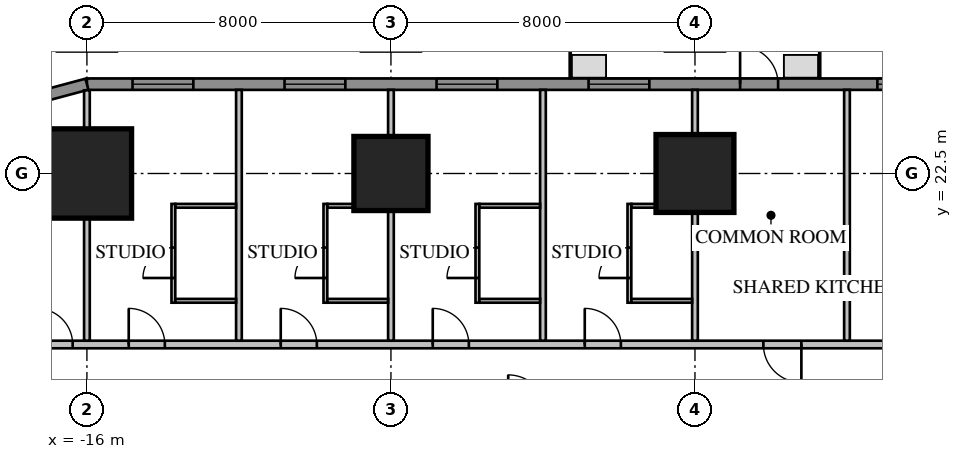
"""IFC4 building model, lengths in metres.
Left out: names, types, materials, properties, quantities, classifications, styles, units other than length and angle.
Written with IfcOpenShell. Run it as: python <this file> out.ifc"""

import sys

from ifc_helpers import new_model, si_unit, direction, frame, frame_2d, origin, origin_2d, place, context, subcontext, project, spatial, rectangle, extrude, element, fill, save


model = new_model("IFC4")
c1 = context("Model", 3, precision=1e-05, world=origin(), true_north=direction((0.0, 1.0)))
c2 = subcontext(c1, "Body", "Model", "MODEL_VIEW")
j1 = project(units=[si_unit("LENGTHUNIT", "METRE"), si_unit("PLANEANGLEUNIT", "RADIAN")], contexts=[c1])
p1 = place(None, origin())
s1 = spatial("IfcSite", under=j1, at=p1, CompositionType="ELEMENT")
p2 = place(p1, origin())
s2 = spatial("IfcBuilding", under=s1, at=p2, CompositionType="ELEMENT")
p3 = place(p2, frame((0.0, 0.0, 50.65)))
s3 = spatial("IfcBuildingStorey", under=s2, at=p3, CompositionType="ELEMENT", Elevation=50.65)
p4 = place(p3, frame((0.0, 22.5, 0.0), z_axis=(0.0, 0.0, 1.0), x_axis=(1.0, 0.0, 0.0)))
e1 = element("IfcColumn", 1, at=p4, inside=s3, PredefinedType="COLUMN", context=c2, shape_type="SweptSolid", body=[
    extrude(rectangle(XDim=2.05, YDim=2.05, at=origin_2d()), origin(), (0.0, 0.0, 1.0), 3.413),
])
p5 = place(p3, frame((-8.0, 22.5, 0.0), z_axis=(0.0, 0.0, 1.0), x_axis=(1.0, 0.0, 0.0)))
e2 = element("IfcColumn", 2, at=p5, inside=s3, PredefinedType="COLUMN", context=c2, shape_type="SweptSolid", body=[
    extrude(rectangle(XDim=1.95, YDim=1.95, at=origin_2d()), origin(), (0.0, 0.0, 1.0), 3.413),
])
p6 = place(p3, frame((-16.0, 22.5, 0.0), z_axis=(0.0, 0.0, 1.0), x_axis=(1.0, 0.0, 0.0)))
e3 = element("IfcColumn", 3, at=p6, inside=s3, PredefinedType="COLUMN", context=c2, shape_type="SweptSolid", body=[
    extrude(rectangle(XDim=2.35, YDim=2.35, at=origin_2d()), origin(), (0.0, 0.0, 1.0), 3.413),
])
p7 = place(p3, frame((16.0, 24.85, 0.0), z_axis=(0.0, 0.0, 1.0), x_axis=(-1.0, 0.0, 0.0)))
e4 = element("IfcWall", 4, at=p7, inside=s3, PredefinedType="SOLIDWALL", context=c2, shape_type="SweptSolid", body=[
    extrude(rectangle(XDim=32.0, YDim=0.3, at=frame_2d((16.0, 0.0))), origin(), (0.0, 0.0, 1.0), 3.65),
])
p8 = place(p7, frame((1.2, 0.0, 0.75)))
e5 = element("IfcOpeningElement", 5, at=p8, cuts=e4, PredefinedType="OPENING", context=c2, shape_type="SweptSolid", body=[
    extrude(rectangle(XDim=1.6, YDim=1.8, at=frame_2d((0.8, 0.9))), frame((0.0, 0.17, 0.0), z_axis=(0.0, -1.0, 0.0), x_axis=(1.0, 0.0, 0.0)), (0.0, 0.0, 1.0), 0.34),
])
p9 = place(p7, frame((5.2, 0.0, 0.75)))
e6 = element("IfcOpeningElement", 6, at=p9, cuts=e4, PredefinedType="OPENING", context=c2, shape_type="SweptSolid", body=[
    extrude(rectangle(XDim=1.6, YDim=1.8, at=frame_2d((0.8, 0.9))), frame((0.0, 0.17, 0.0), z_axis=(0.0, -1.0, 0.0), x_axis=(1.0, 0.0, 0.0)), (0.0, 0.0, 1.0), 0.34),
])
p10 = place(p7, frame((17.2, 0.0, 0.75)))
e7 = element("IfcOpeningElement", 7, at=p10, cuts=e4, PredefinedType="OPENING", context=c2, shape_type="SweptSolid", body=[
    extrude(rectangle(XDim=1.6, YDim=1.8, at=frame_2d((0.8, 0.9))), frame((0.0, 0.17, 0.0), z_axis=(0.0, -1.0, 0.0), x_axis=(1.0, 0.0, 0.0)), (0.0, 0.0, 1.0), 0.34),
])
p11 = place(p7, frame((21.2, 0.0, 0.75)))
e8 = element("IfcOpeningElement", 8, at=p11, cuts=e4, PredefinedType="OPENING", context=c2, shape_type="SweptSolid", body=[
    extrude(rectangle(XDim=1.6, YDim=1.8, at=frame_2d((0.8, 0.9))), frame((0.0, 0.17, 0.0), z_axis=(0.0, -1.0, 0.0), x_axis=(1.0, 0.0, 0.0)), (0.0, 0.0, 1.0), 0.34),
])
p12 = place(p7, frame((25.2, 0.0, 0.75)))
e9 = element("IfcOpeningElement", 9, at=p12, cuts=e4, PredefinedType="OPENING", context=c2, shape_type="SweptSolid", body=[
    extrude(rectangle(XDim=1.6, YDim=1.8, at=frame_2d((0.8, 0.9))), frame((0.0, 0.17, 0.0), z_axis=(0.0, -1.0, 0.0), x_axis=(1.0, 0.0, 0.0)), (0.0, 0.0, 1.0), 0.34),
])
p13 = place(p7, frame((29.2, 0.0, 0.75)))
e10 = element("IfcOpeningElement", 10, at=p13, cuts=e4, PredefinedType="OPENING", context=c2, shape_type="SweptSolid", body=[
    extrude(rectangle(XDim=1.6, YDim=1.8, at=frame_2d((0.8, 0.9))), frame((0.0, 0.17, 0.0), z_axis=(0.0, -1.0, 0.0), x_axis=(1.0, 0.0, 0.0)), (0.0, 0.0, 1.0), 0.34),
])
p14 = place(p7, frame((8.8, 0.0, 0.75)))
e11 = element("IfcOpeningElement", 11, at=p14, cuts=e4, PredefinedType="OPENING", context=c2, shape_type="SweptSolid", body=[
    extrude(rectangle(XDim=2.4, YDim=1.8, at=frame_2d((1.2, 0.9))), frame((0.0, 0.17, 0.0), z_axis=(0.0, -1.0, 0.0), x_axis=(1.0, 0.0, 0.0)), (0.0, 0.0, 1.0), 0.34),
])
p15 = place(p7, frame((13.812, 0.0, 0.0)))
e12 = element("IfcOpeningElement", 12, at=p15, cuts=e4, PredefinedType="OPENING", context=c2, shape_type="SweptSolid", body=[
    extrude(rectangle(XDim=1.0, YDim=2.4, at=frame_2d((0.5, 1.2))), frame((0.0, 0.17, 0.0), z_axis=(0.0, -1.0, 0.0), x_axis=(1.0, 0.0, 0.0)), (0.0, 0.0, 1.0), 0.34),
])
p16 = place(p3, frame((-16.0, 24.85, 0.0), z_axis=(0.0, 0.0, 1.0), x_axis=(-0.965920218567, -0.258839972501, 0.0)))
e13 = element("IfcWall", 13, at=p16, inside=s3, PredefinedType="SOLIDWALL", context=c2, shape_type="SweptSolid", body=[
    extrude(rectangle(XDim=4.581, YDim=0.3, at=frame_2d((2.291, 0.0))), origin(), (0.0, 0.0, 1.0), 3.65),
])
p17 = place(p3, frame((18.0, 18.0, 0.0), z_axis=(0.0, 0.0, 1.0), x_axis=(-1.0, 0.0, 0.0)))
e14 = element("IfcWall", 14, at=p17, inside=s3, PredefinedType="PARTITIONING", context=c2, shape_type="SweptSolid", body=[
    extrude(rectangle(XDim=36.0, YDim=0.2, at=frame_2d((18.0, 0.0))), origin(), (0.0, 0.0, 1.0), 3.65),
])
p18 = place(p17, frame((0.375, 0.0, 0.0)))
e15 = element("IfcOpeningElement", 15, at=p18, cuts=e14, PredefinedType="OPENING", context=c2, shape_type="SweptSolid", body=[
    extrude(rectangle(XDim=1.0, YDim=2.1, at=frame_2d((0.5, 1.05))), frame((0.0, 0.12, 0.0), z_axis=(0.0, -1.0, 0.0), x_axis=(1.0, 0.0, 0.0)), (0.0, 0.0, 1.0), 0.24),
])
p19 = place(p17, frame((3.95, 0.0, 0.0)))
e16 = element("IfcOpeningElement", 16, at=p19, cuts=e14, PredefinedType="OPENING", context=c2, shape_type="SweptSolid", body=[
    extrude(rectangle(XDim=0.95, YDim=2.1, at=frame_2d((0.475, 1.05))), frame((0.0, 0.12, 0.0), z_axis=(0.0, -1.0, 0.0), x_axis=(1.0, 0.0, 0.0)), (0.0, 0.0, 1.0), 0.24),
])
p20 = place(p17, frame((7.95, 0.0, 0.0)))
e17 = element("IfcOpeningElement", 17, at=p20, cuts=e14, PredefinedType="OPENING", context=c2, shape_type="SweptSolid", body=[
    extrude(rectangle(XDim=0.95, YDim=2.1, at=frame_2d((0.475, 1.05))), frame((0.0, 0.12, 0.0), z_axis=(0.0, -1.0, 0.0), x_axis=(1.0, 0.0, 0.0)), (0.0, 0.0, 1.0), 0.24),
])
p21 = place(p17, frame((19.95, 0.0, 0.0)))
e18 = element("IfcOpeningElement", 18, at=p21, cuts=e14, PredefinedType="OPENING", context=c2, shape_type="SweptSolid", body=[
    extrude(rectangle(XDim=0.95, YDim=2.1, at=frame_2d((0.475, 1.05))), frame((0.0, 0.12, 0.0), z_axis=(0.0, -1.0, 0.0), x_axis=(1.0, 0.0, 0.0)), (0.0, 0.0, 1.0), 0.24),
])
p22 = place(p17, frame((23.95, 0.0, 0.0)))
e19 = element("IfcOpeningElement", 19, at=p22, cuts=e14, PredefinedType="OPENING", context=c2, shape_type="SweptSolid", body=[
    extrude(rectangle(XDim=0.95, YDim=2.1, at=frame_2d((0.475, 1.05))), frame((0.0, 0.12, 0.0), z_axis=(0.0, -1.0, 0.0), x_axis=(1.0, 0.0, 0.0)), (0.0, 0.0, 1.0), 0.24),
])
p23 = place(p17, frame((27.95, 0.0, 0.0)))
e20 = element("IfcOpeningElement", 20, at=p23, cuts=e14, PredefinedType="OPENING", context=c2, shape_type="SweptSolid", body=[
    extrude(rectangle(XDim=0.95, YDim=2.1, at=frame_2d((0.475, 1.05))), frame((0.0, 0.12, 0.0), z_axis=(0.0, -1.0, 0.0), x_axis=(1.0, 0.0, 0.0)), (0.0, 0.0, 1.0), 0.24),
])
p24 = place(p17, frame((31.95, 0.0, 0.0)))
e21 = element("IfcOpeningElement", 21, at=p24, cuts=e14, PredefinedType="OPENING", context=c2, shape_type="SweptSolid", body=[
    extrude(rectangle(XDim=0.95, YDim=2.1, at=frame_2d((0.475, 1.05))), frame((0.0, 0.12, 0.0), z_axis=(0.0, -1.0, 0.0), x_axis=(1.0, 0.0, 0.0)), (0.0, 0.0, 1.0), 0.24),
])
p25 = place(p17, frame((34.375, 0.0, 0.0)))
e22 = element("IfcOpeningElement", 22, at=p25, cuts=e14, PredefinedType="OPENING", context=c2, shape_type="SweptSolid", body=[
    extrude(rectangle(XDim=0.95, YDim=2.1, at=frame_2d((0.475, 1.05))), frame((0.0, 0.12, 0.0), z_axis=(0.0, -1.0, 0.0), x_axis=(1.0, 0.0, 0.0)), (0.0, 0.0, 1.0), 0.24),
])
p26 = place(p17, frame((11.2, 0.0, 0.0)))
e23 = element("IfcOpeningElement", 23, at=p26, cuts=e14, PredefinedType="OPENING", context=c2, shape_type="SweptSolid", body=[
    extrude(rectangle(XDim=1.0, YDim=2.1, at=frame_2d((0.5, 1.05))), frame((0.0, 0.12, 0.0), z_axis=(0.0, -1.0, 0.0), x_axis=(1.0, 0.0, 0.0)), (0.0, 0.0, 1.0), 0.24),
])
p27 = place(p17, frame((15.2, 0.0, 0.0)))
e24 = element("IfcOpeningElement", 24, at=p27, cuts=e14, PredefinedType="OPENING", context=c2, shape_type="SweptSolid", body=[
    extrude(rectangle(XDim=1.0, YDim=2.1, at=frame_2d((0.5, 1.05))), frame((0.0, 0.12, 0.0), z_axis=(0.0, -1.0, 0.0), x_axis=(1.0, 0.0, 0.0)), (0.0, 0.0, 1.0), 0.24),
])
p28 = place(p3, frame((4.0, 18.1, 0.0), z_axis=(0.0, 0.0, 1.0), x_axis=(0.0, 1.0, 0.0)))
e25 = element("IfcWall", 25, at=p28, inside=s3, PredefinedType="PARTITIONING", context=c2, shape_type="SweptSolid", body=[
    extrude(rectangle(XDim=6.6, YDim=0.15, at=frame_2d((3.3, 0.0))), origin(), (0.0, 0.0, 1.0), 3.65),
])
p29 = place(p3, frame((0.0, 18.1, 0.0), z_axis=(0.0, 0.0, 1.0), x_axis=(0.0, 1.0, 0.0)))
e26 = element("IfcWall", 26, at=p29, inside=s3, PredefinedType="PARTITIONING", context=c2, shape_type="SweptSolid", body=[
    extrude(rectangle(XDim=6.6, YDim=0.15, at=frame_2d((3.3, 0.0))), origin(), (0.0, 0.0, 1.0), 2.624),
])
for number, where, z_axis, x_axis in (
    (27, (-4.0, 18.1, 0.0), (0.0, 0.0, 1.0), (0.0, 1.0, 0.0)),
    (28, (-8.0, 18.1, 0.0), (0.0, 0.0, 1.0), (0.0, 1.0, 0.0)),
    (29, (-12.0, 18.1, 0.0), (0.0, 0.0, 1.0), (0.0, 1.0, 0.0)),
):
    element("IfcWall", number, at=place(p3, frame(where, z_axis=z_axis, x_axis=x_axis)), inside=s3, PredefinedType="PARTITIONING", context=c2, shape_type="SweptSolid", body=[
        extrude(rectangle(XDim=6.6, YDim=0.15, at=frame_2d((3.3, 0.0))), origin(), (0.0, 0.0, 1.0), 3.65),
    ])
p30 = place(p3, frame((-16.0, 18.1, 0.0), z_axis=(0.0, 0.0, 1.0), x_axis=(0.0, 1.0, 0.0)))
e30 = element("IfcWall", 30, at=p30, inside=s3, PredefinedType="PARTITIONING", context=c2, shape_type="SweptSolid", body=[
    extrude(rectangle(XDim=6.589, YDim=0.15, at=frame_2d((3.295, 0.0))), origin(), (0.0, 0.0, 1.0), 3.65),
])
p31 = place(p3, frame((-1.725, 19.1, 0.0), z_axis=(0.0, 0.0, 1.0), x_axis=(0.0, 1.0, 0.0)))
e31 = element("IfcWall", 31, at=p31, inside=s3, PredefinedType="PARTITIONING", context=c2, shape_type="SweptSolid", body=[
    extrude(rectangle(XDim=2.6, YDim=0.1, at=frame_2d((1.3, 0.0))), origin(), (0.0, 0.0, 1.0), 3.65),
])
p32 = place(p31, frame((0.65, 0.0, 0.0)))
e32 = element("IfcOpeningElement", 32, at=p32, cuts=e31, PredefinedType="OPENING", context=c2, shape_type="SweptSolid", body=[
    extrude(rectangle(XDim=0.8, YDim=2.1, at=frame_2d((0.4, 1.05))), frame((0.0, 0.07, 0.0), z_axis=(0.0, -1.0, 0.0), x_axis=(1.0, 0.0, 0.0)), (0.0, 0.0, 1.0), 0.14),
])
p33 = place(p3, frame((-0.075, 21.65, 0.0), z_axis=(0.0, 0.0, 1.0), x_axis=(-1.0, 0.0, 0.0)))
e33 = element("IfcWall", 33, at=p33, inside=s3, PredefinedType="PARTITIONING", context=c2, shape_type="SweptSolid", body=[
    extrude(rectangle(XDim=1.6, YDim=0.1, at=frame_2d((0.8, 0.0))), origin(), (0.0, 0.0, 1.0), 3.65),
])
p34 = place(p3, frame((-0.075, 19.15, 0.0), z_axis=(0.0, 0.0, 1.0), x_axis=(-1.0, 0.0, 0.0)))
e34 = element("IfcWall", 34, at=p34, inside=s3, PredefinedType="PARTITIONING", context=c2, shape_type="SweptSolid", body=[
    extrude(rectangle(XDim=1.6, YDim=0.1, at=frame_2d((0.8, 0.0))), origin(), (0.0, 0.0, 1.0), 3.038),
])
p35 = place(p3, frame((-5.725, 19.1, 0.0), z_axis=(0.0, 0.0, 1.0), x_axis=(0.0, 1.0, 0.0)))
e35 = element("IfcWall", 35, at=p35, inside=s3, PredefinedType="PARTITIONING", context=c2, shape_type="SweptSolid", body=[
    extrude(rectangle(XDim=2.6, YDim=0.1, at=frame_2d((1.3, 0.0))), origin(), (0.0, 0.0, 1.0), 3.65),
])
p36 = place(p35, frame((0.65, 0.0, 0.0)))
e36 = element("IfcOpeningElement", 36, at=p36, cuts=e35, PredefinedType="OPENING", context=c2, shape_type="SweptSolid", body=[
    extrude(rectangle(XDim=0.8, YDim=2.1, at=frame_2d((0.4, 1.05))), frame((0.0, 0.07, 0.0), z_axis=(0.0, -1.0, 0.0), x_axis=(1.0, 0.0, 0.0)), (0.0, 0.0, 1.0), 0.14),
])
p37 = place(p3, frame((-4.075, 21.65, 0.0), z_axis=(0.0, 0.0, 1.0), x_axis=(-1.0, 0.0, 0.0)))
e37 = element("IfcWall", 37, at=p37, inside=s3, PredefinedType="PARTITIONING", context=c2, shape_type="SweptSolid", body=[
    extrude(rectangle(XDim=1.6, YDim=0.1, at=frame_2d((0.8, 0.0))), origin(), (0.0, 0.0, 1.0), 3.65),
])
p38 = place(p3, frame((-4.075, 19.15, 0.0), z_axis=(0.0, 0.0, 1.0), x_axis=(-1.0, 0.0, 0.0)))
e38 = element("IfcWall", 38, at=p38, inside=s3, PredefinedType="PARTITIONING", context=c2, shape_type="SweptSolid", body=[
    extrude(rectangle(XDim=1.6, YDim=0.1, at=frame_2d((0.8, 0.0))), origin(), (0.0, 0.0, 1.0), 3.038),
])
p39 = place(p3, frame((-9.725, 19.1, 0.0), z_axis=(0.0, 0.0, 1.0), x_axis=(0.0, 1.0, 0.0)))
e39 = element("IfcWall", 39, at=p39, inside=s3, PredefinedType="PARTITIONING", context=c2, shape_type="SweptSolid", body=[
    extrude(rectangle(XDim=2.6, YDim=0.1, at=frame_2d((1.3, 0.0))), origin(), (0.0, 0.0, 1.0), 3.65),
])
p40 = place(p39, frame((0.65, 0.0, 0.0)))
e40 = element("IfcOpeningElement", 40, at=p40, cuts=e39, PredefinedType="OPENING", context=c2, shape_type="SweptSolid", body=[
    extrude(rectangle(XDim=0.8, YDim=2.1, at=frame_2d((0.4, 1.05))), frame((0.0, 0.07, 0.0), z_axis=(0.0, -1.0, 0.0), x_axis=(1.0, 0.0, 0.0)), (0.0, 0.0, 1.0), 0.14),
])
p41 = place(p3, frame((-8.075, 21.65, 0.0), z_axis=(0.0, 0.0, 1.0), x_axis=(-1.0, 0.0, 0.0)))
e41 = element("IfcWall", 41, at=p41, inside=s3, PredefinedType="PARTITIONING", context=c2, shape_type="SweptSolid", body=[
    extrude(rectangle(XDim=1.6, YDim=0.1, at=frame_2d((0.8, 0.0))), origin(), (0.0, 0.0, 1.0), 3.65),
])
p42 = place(p3, frame((-8.075, 19.15, 0.0), z_axis=(0.0, 0.0, 1.0), x_axis=(-1.0, 0.0, 0.0)))
e42 = element("IfcWall", 42, at=p42, inside=s3, PredefinedType="PARTITIONING", context=c2, shape_type="SweptSolid", body=[
    extrude(rectangle(XDim=1.6, YDim=0.1, at=frame_2d((0.8, 0.0))), origin(), (0.0, 0.0, 1.0), 3.038),
])
p43 = place(p3, frame((-13.725, 19.1, 0.0), z_axis=(0.0, 0.0, 1.0), x_axis=(0.0, 1.0, 0.0)))
e43 = element("IfcWall", 43, at=p43, inside=s3, PredefinedType="PARTITIONING", context=c2, shape_type="SweptSolid", body=[
    extrude(rectangle(XDim=2.6, YDim=0.1, at=frame_2d((1.3, 0.0))), origin(), (0.0, 0.0, 1.0), 3.65),
])
p44 = place(p43, frame((0.65, 0.0, 0.0)))
e44 = element("IfcOpeningElement", 44, at=p44, cuts=e43, PredefinedType="OPENING", context=c2, shape_type="SweptSolid", body=[
    extrude(rectangle(XDim=0.8, YDim=2.1, at=frame_2d((0.4, 1.05))), frame((0.0, 0.07, 0.0), z_axis=(0.0, -1.0, 0.0), x_axis=(1.0, 0.0, 0.0)), (0.0, 0.0, 1.0), 0.14),
])
p45 = place(p3, frame((-12.075, 21.65, 0.0), z_axis=(0.0, 0.0, 1.0), x_axis=(-1.0, 0.0, 0.0)))
e45 = element("IfcWall", 45, at=p45, inside=s3, PredefinedType="PARTITIONING", context=c2, shape_type="SweptSolid", body=[
    extrude(rectangle(XDim=1.6, YDim=0.1, at=frame_2d((0.8, 0.0))), origin(), (0.0, 0.0, 1.0), 3.65),
])
p46 = place(p3, frame((-12.075, 19.15, 0.0), z_axis=(0.0, 0.0, 1.0), x_axis=(-1.0, 0.0, 0.0)))
e46 = element("IfcWall", 46, at=p46, inside=s3, PredefinedType="PARTITIONING", context=c2, shape_type="SweptSolid", body=[
    extrude(rectangle(XDim=1.6, YDim=0.1, at=frame_2d((0.8, 0.0))), origin(), (0.0, 0.0, 1.0), 3.038),
])
p47 = place(p10, origin())
e47 = element("IfcWindow", 47, at=p47, inside=s3, PartitioningType="SINGLE_PANEL", PredefinedType="WINDOW", context=c2, shape_type="SweptSolid", body=[
    extrude(rectangle(XDim=1.6, YDim=1.8, at=frame_2d((0.8, 0.9))), frame((0.0, 0.03, 0.0), z_axis=(0.0, -1.0, 0.0), x_axis=(1.0, 0.0, 0.0)), (0.0, 0.0, 1.0), 0.06),
])
fill(e7, e47)
p48 = place(p11, origin())
e48 = element("IfcWindow", 48, at=p48, inside=s3, PartitioningType="SINGLE_PANEL", PredefinedType="WINDOW", context=c2, shape_type="SweptSolid", body=[
    extrude(rectangle(XDim=1.6, YDim=1.8, at=frame_2d((0.8, 0.9))), frame((0.0, 0.03, 0.0), z_axis=(0.0, -1.0, 0.0), x_axis=(1.0, 0.0, 0.0)), (0.0, 0.0, 1.0), 0.06),
])
fill(e8, e48)
p49 = place(p12, origin())
e49 = element("IfcWindow", 49, at=p49, inside=s3, PartitioningType="SINGLE_PANEL", PredefinedType="WINDOW", context=c2, shape_type="SweptSolid", body=[
    extrude(rectangle(XDim=1.6, YDim=1.8, at=frame_2d((0.8, 0.9))), frame((0.0, 0.03, 0.0), z_axis=(0.0, -1.0, 0.0), x_axis=(1.0, 0.0, 0.0)), (0.0, 0.0, 1.0), 0.06),
])
fill(e9, e49)
p50 = place(p13, origin())
e50 = element("IfcWindow", 50, at=p50, inside=s3, PartitioningType="SINGLE_PANEL", PredefinedType="WINDOW", context=c2, shape_type="SweptSolid", body=[
    extrude(rectangle(XDim=1.6, YDim=1.8, at=frame_2d((0.8, 0.9))), frame((0.0, 0.03, 0.0), z_axis=(0.0, -1.0, 0.0), x_axis=(1.0, 0.0, 0.0)), (0.0, 0.0, 1.0), 0.06),
])
fill(e10, e50)
p51 = place(p14, origin())
e51 = element("IfcWindow", 51, at=p51, inside=s3, PartitioningType="SINGLE_PANEL", PredefinedType="WINDOW", context=c2, shape_type="SweptSolid", body=[
    extrude(rectangle(XDim=2.4, YDim=1.8, at=frame_2d((1.2, 0.9))), frame((0.0, 0.03, 0.0), z_axis=(0.0, -1.0, 0.0), x_axis=(1.0, 0.0, 0.0)), (0.0, 0.0, 1.0), 0.06),
])
fill(e11, e51)
p52 = place(p15, origin())
e52 = element("IfcDoor", 52, at=p52, inside=s3, OperationType="SINGLE_SWING_RIGHT", PredefinedType="DOOR", context=c2, shape_type="SweptSolid", body=[
    extrude(rectangle(XDim=1.0, YDim=2.4, at=frame_2d((0.5, 1.2))), frame((0.0, 0.025, 0.0), z_axis=(0.0, -1.0, 0.0), x_axis=(1.0, 0.0, 0.0)), (0.0, 0.0, 1.0), 0.05),
])
fill(e12, e52)
p53 = place(p21, origin())
e53 = element("IfcDoor", 53, at=p53, inside=s3, OperationType="SINGLE_SWING_RIGHT", PredefinedType="DOOR", context=c2, shape_type="SweptSolid", body=[
    extrude(rectangle(XDim=0.95, YDim=2.1, at=frame_2d((0.475, 1.05))), frame((0.0, 0.025, 0.0), z_axis=(0.0, -1.0, 0.0), x_axis=(1.0, 0.0, 0.0)), (0.0, 0.0, 1.0), 0.05),
])
fill(e18, e53)
p54 = place(p32, origin())
e54 = element("IfcDoor", 54, at=p54, inside=s3, OperationType="SINGLE_SWING_LEFT", PredefinedType="DOOR", context=c2, shape_type="SweptSolid", body=[
    extrude(rectangle(XDim=0.8, YDim=2.1, at=frame_2d((0.4, 1.05))), frame((0.0, 0.025, 0.0), z_axis=(0.0, -1.0, 0.0), x_axis=(1.0, 0.0, 0.0)), (0.0, 0.0, 1.0), 0.05),
])
fill(e32, e54)
p55 = place(p22, origin())
e55 = element("IfcDoor", 55, at=p55, inside=s3, OperationType="SINGLE_SWING_RIGHT", PredefinedType="DOOR", context=c2, shape_type="SweptSolid", body=[
    extrude(rectangle(XDim=0.95, YDim=2.1, at=frame_2d((0.475, 1.05))), frame((0.0, 0.025, 0.0), z_axis=(0.0, -1.0, 0.0), x_axis=(1.0, 0.0, 0.0)), (0.0, 0.0, 1.0), 0.05),
])
fill(e19, e55)
p56 = place(p36, origin())
e56 = element("IfcDoor", 56, at=p56, inside=s3, OperationType="SINGLE_SWING_LEFT", PredefinedType="DOOR", context=c2, shape_type="SweptSolid", body=[
    extrude(rectangle(XDim=0.8, YDim=2.1, at=frame_2d((0.4, 1.05))), frame((0.0, 0.025, 0.0), z_axis=(0.0, -1.0, 0.0), x_axis=(1.0, 0.0, 0.0)), (0.0, 0.0, 1.0), 0.05),
])
fill(e36, e56)
p57 = place(p23, origin())
e57 = element("IfcDoor", 57, at=p57, inside=s3, OperationType="SINGLE_SWING_RIGHT", PredefinedType="DOOR", context=c2, shape_type="SweptSolid", body=[
    extrude(rectangle(XDim=0.95, YDim=2.1, at=frame_2d((0.475, 1.05))), frame((0.0, 0.025, 0.0), z_axis=(0.0, -1.0, 0.0), x_axis=(1.0, 0.0, 0.0)), (0.0, 0.0, 1.0), 0.05),
])
fill(e20, e57)
p58 = place(p40, origin())
e58 = element("IfcDoor", 58, at=p58, inside=s3, OperationType="SINGLE_SWING_LEFT", PredefinedType="DOOR", context=c2, shape_type="SweptSolid", body=[
    extrude(rectangle(XDim=0.8, YDim=2.1, at=frame_2d((0.4, 1.05))), frame((0.0, 0.025, 0.0), z_axis=(0.0, -1.0, 0.0), x_axis=(1.0, 0.0, 0.0)), (0.0, 0.0, 1.0), 0.05),
])
fill(e40, e58)
p59 = place(p24, origin())
e59 = element("IfcDoor", 59, at=p59, inside=s3, OperationType="SINGLE_SWING_RIGHT", PredefinedType="DOOR", context=c2, shape_type="SweptSolid", body=[
    extrude(rectangle(XDim=0.95, YDim=2.1, at=frame_2d((0.475, 1.05))), frame((0.0, 0.025, 0.0), z_axis=(0.0, -1.0, 0.0), x_axis=(1.0, 0.0, 0.0)), (0.0, 0.0, 1.0), 0.05),
])
fill(e21, e59)
p60 = place(p44, origin())
e60 = element("IfcDoor", 60, at=p60, inside=s3, OperationType="SINGLE_SWING_LEFT", PredefinedType="DOOR", context=c2, shape_type="SweptSolid", body=[
    extrude(rectangle(XDim=0.8, YDim=2.1, at=frame_2d((0.4, 1.05))), frame((0.0, 0.025, 0.0), z_axis=(0.0, -1.0, 0.0), x_axis=(1.0, 0.0, 0.0)), (0.0, 0.0, 1.0), 0.05),
])
fill(e44, e60)
p61 = place(p25, origin())
e61 = element("IfcDoor", 61, at=p61, inside=s3, OperationType="SINGLE_SWING_RIGHT", PredefinedType="DOOR", context=c2, shape_type="SweptSolid", body=[
    extrude(rectangle(XDim=0.95, YDim=2.1, at=frame_2d((0.475, 1.05))), frame((0.0, 0.025, 0.0), z_axis=(0.0, -1.0, 0.0), x_axis=(1.0, 0.0, 0.0)), (0.0, 0.0, 1.0), 0.05),
])
fill(e22, e61)
p62 = place(p27, origin())
e62 = element("IfcDoor", 62, at=p62, inside=s3, OperationType="SINGLE_SWING_LEFT", PredefinedType="DOOR", context=c2, shape_type="SweptSolid", body=[
    extrude(rectangle(XDim=1.0, YDim=2.1, at=frame_2d((0.5, 1.05))), frame((0.0, 0.025, 0.0), z_axis=(0.0, -1.0, 0.0), x_axis=(1.0, 0.0, 0.0)), (0.0, 0.0, 1.0), 0.05),
])
fill(e24, e62)
save(model, sys.argv[1])
